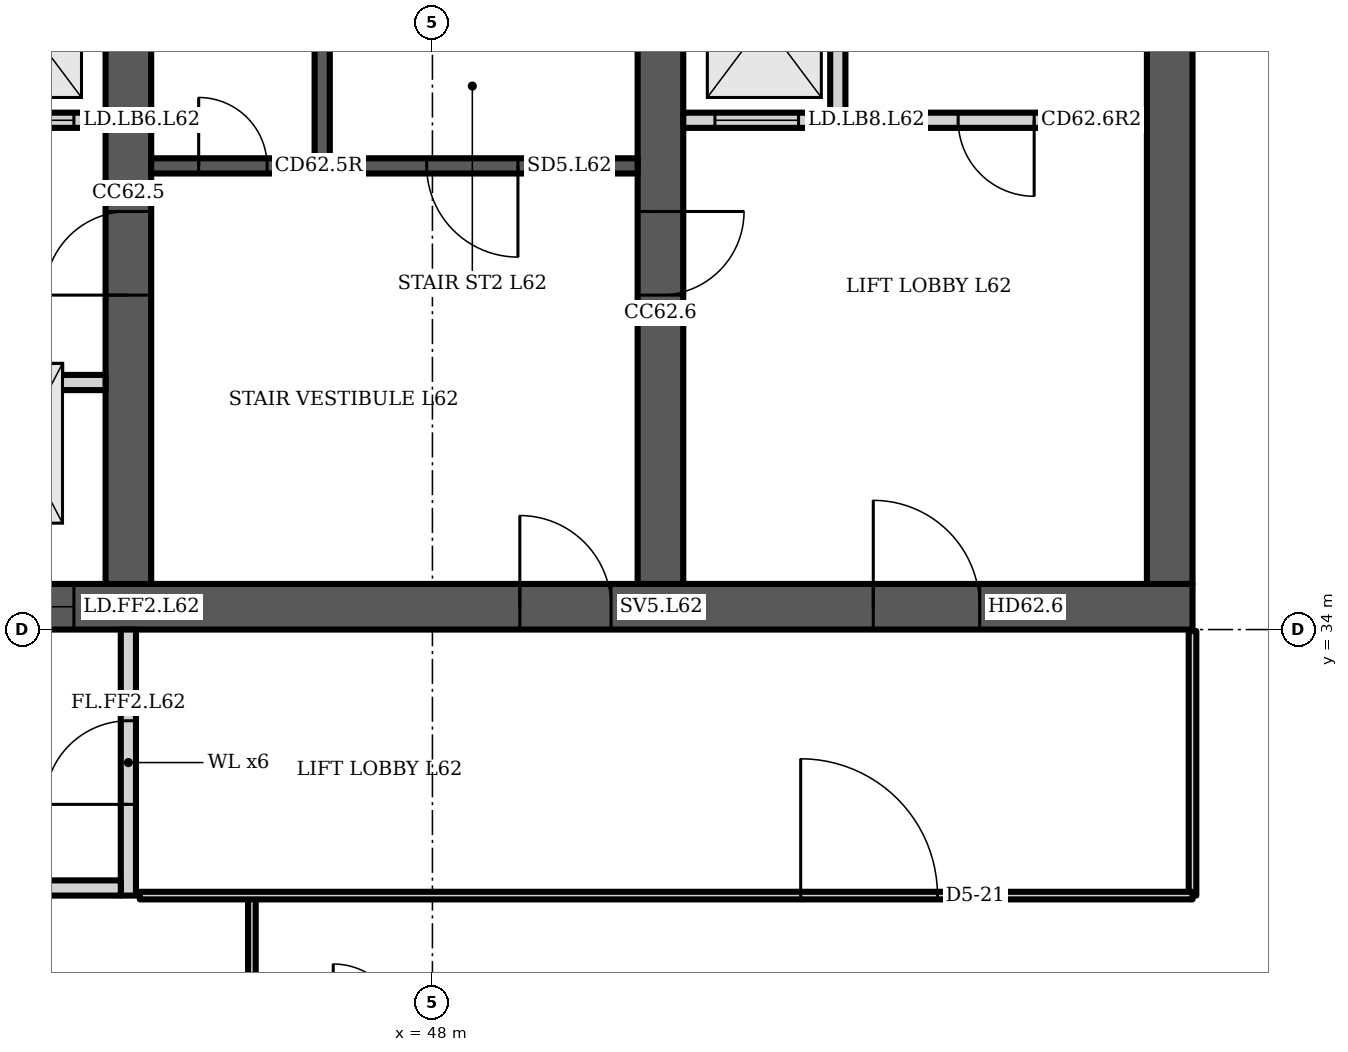
"""IFC4 building model, lengths in metres.
Left out: names, types, materials, properties, quantities, classifications, styles, units other than length and angle.
Written with IfcOpenShell. Run it as: python <this file> out.ifc"""

import sys

from ifc_helpers import new_model, si_unit, direction, frame, frame_2d, origin, place, context, subcontext, project, spatial, polyline, rectangle, outline, extrude, element, fill, save


model = new_model("IFC4")
c1 = context("Model", 3, precision=1e-05, world=origin(), true_north=direction((0.0, 1.0)))
c2 = subcontext(c1, "Body", "Model", "MODEL_VIEW")
j1 = project(units=[si_unit("LENGTHUNIT", "METRE"), si_unit("PLANEANGLEUNIT", "RADIAN")], contexts=[c1])
p1 = place(None, origin())
s1 = spatial("IfcSite", under=j1, at=p1, CompositionType="ELEMENT")
p2 = place(p1, origin())
s2 = spatial("IfcBuilding", under=s1, at=p2, CompositionType="ELEMENT")
p3 = place(p2, frame((0.0, 0.0, 246.7)))
s3 = spatial("IfcBuildingStorey", under=s2, at=p3, CompositionType="ELEMENT", Elevation=246.7)
p4 = place(p3, frame((23.0, 34.3, 0.0), z_axis=(0.0, 0.0, 1.0), x_axis=(1.0, 0.0, 0.0)))
e1 = element("IfcWall", 1, at=p4, inside=s3, PredefinedType="SHEAR", context=c2, shape_type="SweptSolid", body=[
    extrude(rectangle(XDim=35.0, YDim=0.6, at=frame_2d((17.5, 0.0))), origin(), (0.0, 0.0, 1.0), 3.6),
])
p5 = place(p4, frame((0.65, 0.0, 0.0)))
e2 = element("IfcOpeningElement", 2, at=p5, cuts=e1, PredefinedType="OPENING", context=c2, shape_type="SweptSolid", body=[
    extrude(rectangle(XDim=1.2, YDim=2.1, at=frame_2d((0.6, 1.05))), frame((0.0, 0.31, 0.0), z_axis=(0.0, -1.0, 0.0), x_axis=(1.0, 0.0, 0.0)), (0.0, 0.0, 1.0), 0.62),
])
p6 = place(p4, frame((7.717, 0.0, 0.0)))
e3 = element("IfcOpeningElement", 3, at=p6, cuts=e1, PredefinedType="OPENING", context=c2, shape_type="SweptSolid", body=[
    extrude(rectangle(XDim=1.1, YDim=2.1, at=frame_2d((0.55, 1.05))), frame((0.0, 0.31, 0.0), z_axis=(0.0, -1.0, 0.0), x_axis=(1.0, 0.0, 0.0)), (0.0, 0.0, 1.0), 0.62),
])
p7 = place(p4, frame((12.183, 0.0, 0.0)))
e4 = element("IfcOpeningElement", 4, at=p7, cuts=e1, PredefinedType="OPENING", context=c2, shape_type="SweptSolid", body=[
    extrude(rectangle(XDim=1.1, YDim=2.1, at=frame_2d((0.55, 1.05))), frame((0.0, 0.31, 0.0), z_axis=(0.0, -1.0, 0.0), x_axis=(1.0, 0.0, 0.0)), (0.0, 0.0, 1.0), 0.62),
])
p8 = place(p4, frame((9.8, 0.0, 0.0)))
e5 = element("IfcOpeningElement", 5, at=p8, cuts=e1, PredefinedType="OPENING", context=c2, shape_type="SweptSolid", body=[
    extrude(rectangle(XDim=1.4, YDim=2.1, at=frame_2d((0.7, 1.05))), frame((0.0, 0.31, 0.0), z_axis=(0.0, -1.0, 0.0), x_axis=(1.0, 0.0, 0.0)), (0.0, 0.0, 1.0), 0.62),
])
p9 = place(p4, frame((14.717, 0.0, 0.0)))
e6 = element("IfcOpeningElement", 6, at=p9, cuts=e1, PredefinedType="OPENING", context=c2, shape_type="SweptSolid", body=[
    extrude(rectangle(XDim=1.1, YDim=2.1, at=frame_2d((0.55, 1.05))), frame((0.0, 0.31, 0.0), z_axis=(0.0, -1.0, 0.0), x_axis=(1.0, 0.0, 0.0)), (0.0, 0.0, 1.0), 0.62),
])
p10 = place(p4, frame((16.95, 0.0, 0.0)))
e7 = element("IfcOpeningElement", 7, at=p10, cuts=e1, PredefinedType="OPENING", context=c2, shape_type="SweptSolid", body=[
    extrude(rectangle(XDim=1.1, YDim=2.1, at=frame_2d((0.55, 1.05))), frame((0.0, 0.31, 0.0), z_axis=(0.0, -1.0, 0.0), x_axis=(1.0, 0.0, 0.0)), (0.0, 0.0, 1.0), 0.62),
])
p11 = place(p4, frame((19.183, 0.0, 0.0)))
e8 = element("IfcOpeningElement", 8, at=p11, cuts=e1, PredefinedType="OPENING", context=c2, shape_type="SweptSolid", body=[
    extrude(rectangle(XDim=1.1, YDim=2.1, at=frame_2d((0.55, 1.05))), frame((0.0, 0.31, 0.0), z_axis=(0.0, -1.0, 0.0), x_axis=(1.0, 0.0, 0.0)), (0.0, 0.0, 1.0), 0.62),
])
p12 = place(p4, frame((26.15, 0.0, 0.0)))
e9 = element("IfcOpeningElement", 9, at=p12, cuts=e1, PredefinedType="OPENING", context=c2, shape_type="SweptSolid", body=[
    extrude(rectangle(XDim=1.2, YDim=2.1, at=frame_2d((0.6, 1.05))), frame((0.0, 0.31, 0.0), z_axis=(0.0, -1.0, 0.0), x_axis=(1.0, 0.0, 0.0)), (0.0, 0.0, 1.0), 0.62),
])
p13 = place(p4, frame((30.8, 0.0, 0.0)))
e10 = element("IfcOpeningElement", 10, at=p13, cuts=e1, PredefinedType="OPENING", context=c2, shape_type="SweptSolid", body=[
    extrude(rectangle(XDim=1.4, YDim=2.1, at=frame_2d((0.7, 1.05))), frame((0.0, 0.31, 0.0), z_axis=(0.0, -1.0, 0.0), x_axis=(1.0, 0.0, 0.0)), (0.0, 0.0, 1.0), 0.62),
])
p14 = place(p3, frame((44.0, 34.6, 0.0), z_axis=(0.0, 0.0, 1.0), x_axis=(0.0, 1.0, 0.0)))
e11 = element("IfcWall", 11, at=p14, inside=s3, PredefinedType="SHEAR", context=c2, shape_type="SweptSolid", body=[
    extrude(rectangle(XDim=14.784, YDim=0.6, at=frame_2d((7.392, 0.0))), origin(), (0.0, 0.0, 1.0), 3.6),
])
p15 = place(p14, frame((11.608, 0.0, 0.0)))
e12 = element("IfcOpeningElement", 12, at=p15, cuts=e11, PredefinedType="OPENING", context=c2, shape_type="SweptSolid", body=[
    extrude(rectangle(XDim=1.0, YDim=2.1, at=frame_2d((0.5, 1.05))), frame((0.0, 0.31, 0.0), z_axis=(0.0, -1.0, 0.0), x_axis=(1.0, 0.0, 0.0)), (0.0, 0.0, 1.0), 0.62),
])
p16 = place(p14, frame((3.8, 0.0, 0.0)))
e13 = element("IfcOpeningElement", 13, at=p16, cuts=e11, PredefinedType="OPENING", context=c2, shape_type="SweptSolid", body=[
    extrude(rectangle(XDim=1.1, YDim=2.1, at=frame_2d((0.55, 1.05))), frame((0.0, 0.31, 0.0), z_axis=(0.0, -1.0, 0.0), x_axis=(1.0, 0.0, 0.0)), (0.0, 0.0, 1.0), 0.62),
])
p17 = place(p3, frame((51.0, 34.6, 0.0), z_axis=(0.0, 0.0, 1.0), x_axis=(0.0, 1.0, 0.0)))
e14 = element("IfcWall", 14, at=p17, inside=s3, PredefinedType="SHEAR", context=c2, shape_type="SweptSolid", body=[
    extrude(rectangle(XDim=14.171, YDim=0.6, at=frame_2d((7.085, 0.0))), origin(), (0.0, 0.0, 1.0), 3.6),
])
p18 = place(p17, frame((3.8, 0.0, 0.0)))
e15 = element("IfcOpeningElement", 15, at=p18, cuts=e14, PredefinedType="OPENING", context=c2, shape_type="SweptSolid", body=[
    extrude(rectangle(XDim=1.1, YDim=2.1, at=frame_2d((0.55, 1.05))), frame((0.0, 0.31, 0.0), z_axis=(0.0, -1.0, 0.0), x_axis=(1.0, 0.0, 0.0)), (0.0, 0.0, 1.0), 0.62),
])
p19 = place(p3, frame((57.7, 34.6, 0.0), z_axis=(0.0, 0.0, 1.0), x_axis=(0.0, 1.0, 0.0)))
e16 = element("IfcWall", 16, at=p19, inside=s3, PredefinedType="SHEAR", context=c2, shape_type="SweptSolid", body=[
    extrude(rectangle(XDim=13.585, YDim=0.6, at=frame_2d((6.792, 0.0))), origin(), (0.0, 0.0, 1.0), 3.6),
])
p20 = place(p3, frame((37.3, 40.7, 0.0), z_axis=(0.0, 0.0, 1.0), x_axis=(1.0, 0.0, 0.0)))
e17 = element("IfcWall", 17, at=p20, inside=s3, PredefinedType="PARTITIONING", context=c2, shape_type="SweptSolid", body=[
    extrude(rectangle(XDim=6.4, YDim=0.2, at=frame_2d((3.2, 0.0))), origin(), (0.0, 0.0, 1.0), 3.2),
])
p21 = place(p20, frame((0.417, 0.0, 0.0)))
e18 = element("IfcOpeningElement", 18, at=p21, cuts=e17, PredefinedType="OPENING", context=c2, shape_type="SweptSolid", body=[
    extrude(rectangle(XDim=1.1, YDim=2.1, at=frame_2d((0.55, 1.05))), frame((0.0, 0.11, 0.0), z_axis=(0.0, -1.0, 0.0), x_axis=(1.0, 0.0, 0.0)), (0.0, 0.0, 1.0), 0.22),
])
p22 = place(p20, frame((2.65, 0.0, 0.0)))
e19 = element("IfcOpeningElement", 19, at=p22, cuts=e17, PredefinedType="OPENING", context=c2, shape_type="SweptSolid", body=[
    extrude(rectangle(XDim=1.1, YDim=2.1, at=frame_2d((0.55, 1.05))), frame((0.0, 0.11, 0.0), z_axis=(0.0, -1.0, 0.0), x_axis=(1.0, 0.0, 0.0)), (0.0, 0.0, 1.0), 0.22),
])
p23 = place(p20, frame((4.883, 0.0, 0.0)))
e20 = element("IfcOpeningElement", 20, at=p23, cuts=e17, PredefinedType="OPENING", context=c2, shape_type="SweptSolid", body=[
    extrude(rectangle(XDim=1.1, YDim=2.1, at=frame_2d((0.55, 1.05))), frame((0.0, 0.11, 0.0), z_axis=(0.0, -1.0, 0.0), x_axis=(1.0, 0.0, 0.0)), (0.0, 0.0, 1.0), 0.22),
])
p24 = place(p3, frame((0.0, 0.0, -0.0)))
e21 = element("IfcWall", 21, at=p24, inside=s3, PredefinedType="PARTITIONING", context=c2, shape_type="SweptSolid", body=[
    extrude(outline(polyline([(41.567, 37.1), (39.433, 37.1), (39.433, 34.6), (39.233, 34.6), (39.233, 37.45), (37.3, 37.45), (37.3, 37.65), (39.233, 37.65), (39.433, 37.65), (39.433, 37.3), (41.567, 37.3), (41.567, 37.35), (41.767, 37.35), (43.7, 37.35), (43.7, 37.15), (41.767, 37.15), (41.767, 34.6), (41.567, 34.6), (41.567, 37.1)])), origin(), (0.0, 0.0, 1.0), 3.2),
])
p25 = place(p3, frame((0.0, 0.0, -0.0)))
e22 = element("IfcWall", 22, at=p25, inside=s3, PredefinedType="PARTITIONING", context=c2, shape_type="SweptSolid", body=[
    extrude(outline(polyline([(39.433, 40.8), (39.233, 40.8), (39.233, 43.8), (37.3, 43.8), (37.3, 44.0), (43.7, 44.0), (43.7, 43.8), (41.767, 43.8), (41.767, 40.8), (41.567, 40.8), (41.567, 43.8), (39.433, 43.8), (39.433, 40.8)])), origin(), (0.0, 0.0, 1.0), 3.2),
])
p26 = place(p3, frame((44.3, 40.1, 0.0), z_axis=(0.0, 0.0, 1.0), x_axis=(1.0, 0.0, 0.0)))
e23 = element("IfcWall", 23, at=p26, inside=s3, PredefinedType="SHEAR", context=c2, shape_type="SweptSolid", body=[
    extrude(rectangle(XDim=6.4, YDim=0.2, at=frame_2d((3.2, 0.0))), origin(), (0.0, 0.0, 1.0), 3.2),
])
p27 = place(p26, frame((3.625, 0.0, 0.0)))
e24 = element("IfcOpeningElement", 24, at=p27, cuts=e23, PredefinedType="OPENING", context=c2, shape_type="SweptSolid", body=[
    extrude(rectangle(XDim=1.2, YDim=2.1, at=frame_2d((0.6, 1.05))), frame((0.0, 0.11, 0.0), z_axis=(0.0, -1.0, 0.0), x_axis=(1.0, 0.0, 0.0)), (0.0, 0.0, 1.0), 0.22),
])
p28 = place(p26, frame((0.625, 0.0, 0.0)))
e25 = element("IfcOpeningElement", 25, at=p28, cuts=e23, PredefinedType="OPENING", context=c2, shape_type="SweptSolid", body=[
    extrude(rectangle(XDim=0.9, YDim=2.1, at=frame_2d((0.45, 1.05))), frame((0.0, 0.11, 0.0), z_axis=(0.0, -1.0, 0.0), x_axis=(1.0, 0.0, 0.0)), (0.0, 0.0, 1.0), 0.22),
])
p29 = place(p3, frame((46.55, 40.2, 0.0), z_axis=(0.0, 0.0, 1.0), x_axis=(0.0, 1.0, 0.0)))
e26 = element("IfcWall", 26, at=p29, inside=s3, PredefinedType="SHEAR", context=c2, shape_type="SweptSolid", body=[
    extrude(rectangle(XDim=7.2, YDim=0.2, at=frame_2d((3.6, 0.0))), origin(), (0.0, 0.0, 1.0), 3.2),
])
p30 = place(p3, frame((51.3, 40.7, 0.0), z_axis=(0.0, 0.0, 1.0), x_axis=(1.0, 0.0, 0.0)))
e27 = element("IfcWall", 27, at=p30, inside=s3, PredefinedType="PARTITIONING", context=c2, shape_type="SweptSolid", body=[
    extrude(rectangle(XDim=6.1, YDim=0.2, at=frame_2d((3.05, 0.0))), origin(), (0.0, 0.0, 1.0), 3.2),
])
p31 = place(p30, frame((0.417, 0.0, 0.0)))
e28 = element("IfcOpeningElement", 28, at=p31, cuts=e27, PredefinedType="OPENING", context=c2, shape_type="SweptSolid", body=[
    extrude(rectangle(XDim=1.1, YDim=2.1, at=frame_2d((0.55, 1.05))), frame((0.0, 0.11, 0.0), z_axis=(0.0, -1.0, 0.0), x_axis=(1.0, 0.0, 0.0)), (0.0, 0.0, 1.0), 0.22),
])
p32 = place(p30, frame((3.617, 0.0, 0.0)))
e29 = element("IfcOpeningElement", 29, at=p32, cuts=e27, PredefinedType="OPENING", context=c2, shape_type="SweptSolid", body=[
    extrude(rectangle(XDim=1.0, YDim=2.1, at=frame_2d((0.5, 1.05))), frame((0.0, 0.11, 0.0), z_axis=(0.0, -1.0, 0.0), x_axis=(1.0, 0.0, 0.0)), (0.0, 0.0, 1.0), 0.22),
])
p33 = place(p3, frame((0.0, 0.0, -0.0)))
e30 = element("IfcWall", 30, at=p33, inside=s3, PredefinedType="PARTITIONING", context=c2, shape_type="SweptSolid", body=[
    extrude(outline(polyline([(53.433, 40.8), (53.433, 43.8), (53.233, 43.8), (53.233, 40.8), (53.433, 40.8)])), origin(), (0.0, 0.0, 1.0), 3.2),
])
p34 = place(p3, frame((44.0, 30.5, 0.0), z_axis=(0.0, 0.0, 1.0), x_axis=(0.0, 1.0, 0.0)))
e31 = element("IfcWall", 31, at=p34, inside=s3, PredefinedType="PARTITIONING", context=c2, shape_type="SweptSolid", body=[
    extrude(rectangle(XDim=3.5, YDim=0.2, at=frame_2d((1.75, 0.0))), origin(), (0.0, 0.0, 1.0), 3.2),
])
p35 = place(p34, frame((1.2, 0.0, 0.0)))
e32 = element("IfcOpeningElement", 32, at=p35, cuts=e31, PredefinedType="OPENING", context=c2, shape_type="SweptSolid", body=[
    extrude(rectangle(XDim=1.1, YDim=2.1, at=frame_2d((0.55, 1.05))), frame((0.0, 0.11, 0.0), z_axis=(0.0, -1.0, 0.0), x_axis=(1.0, 0.0, 0.0)), (0.0, 0.0, 1.0), 0.22),
])
p36 = place(p3, frame((41.1, 30.6, 0.0), z_axis=(0.0, 0.0, 1.0), x_axis=(1.0, 0.0, 0.0)))
e33 = element("IfcWall", 33, at=p36, inside=s3, PredefinedType="PARTITIONING", context=c2, shape_type="SweptSolid", body=[
    extrude(rectangle(XDim=2.8, YDim=0.2, at=frame_2d((1.4, 0.0))), origin(), (0.0, 0.0, 1.0), 3.2),
])
p37 = place(p3, frame((45.625, 22.36, 0.0), z_axis=(0.0, 0.0, 1.0), x_axis=(0.0, 1.0, 0.0)))
e34 = element("IfcWall", 34, at=p37, inside=s3, PredefinedType="PARTITIONING", context=c2, shape_type="SweptSolid", body=[
    extrude(rectangle(XDim=8.13, YDim=0.1, at=frame_2d((4.065, 0.0))), origin(), (0.0, 0.0, 1.0), 3.2),
])
p38 = place(p3, frame((58.0, 30.5, 0.0), z_axis=(0.0, 0.0, 1.0), x_axis=(0.0, 1.0, 0.0)))
e35 = element("IfcWall", 35, at=p38, inside=s3, PredefinedType="PARTITIONING", context=c2, shape_type="SweptSolid", body=[
    extrude(rectangle(XDim=3.48, YDim=0.1, at=frame_2d((1.74, 0.0))), origin(), (0.0, 0.0, 1.0), 3.2),
])
p39 = place(p3, frame((44.15, 30.5, 0.0), z_axis=(0.0, 0.0, 1.0), x_axis=(1.0, 0.0, 0.0)))
e36 = element("IfcWall", 36, at=p39, inside=s3, PredefinedType="PARTITIONING", context=c2, shape_type="SweptSolid", body=[
    extrude(rectangle(XDim=13.85, YDim=0.1, at=frame_2d((6.925, 0.0))), origin(), (0.0, 0.0, 1.0), 3.2),
])
p40 = place(p39, frame((8.695, 0.0, 0.0)))
e37 = element("IfcOpeningElement", 37, at=p40, cuts=e36, PredefinedType="OPENING", context=c2, shape_type="SweptSolid", body=[
    extrude(rectangle(XDim=1.8, YDim=2.1, at=frame_2d((0.9, 1.05))), frame((0.0, 0.06, 0.0), z_axis=(0.0, -1.0, 0.0), x_axis=(1.0, 0.0, 0.0)), (0.0, 0.0, 1.0), 0.12),
])
p41 = place(p11, origin())
e38 = element("IfcDoor", 38, at=p41, inside=s3, OperationType="DOUBLE_DOOR_SLIDING", PredefinedType="DOOR", context=c2, shape_type="SweptSolid", body=[
    extrude(rectangle(XDim=1.1, YDim=2.1, at=frame_2d((0.55, 1.05))), frame((0.0, 0.025, 0.0), z_axis=(0.0, -1.0, 0.0), x_axis=(1.0, 0.0, 0.0)), (0.0, 0.0, 1.0), 0.05),
])
fill(e8, e38)
p42 = place(p23, origin())
e39 = element("IfcDoor", 39, at=p42, inside=s3, OperationType="DOUBLE_DOOR_SLIDING", PredefinedType="DOOR", context=c2, shape_type="SweptSolid", body=[
    extrude(rectangle(XDim=1.1, YDim=2.1, at=frame_2d((0.55, 1.05))), frame((0.0, 0.025, 0.0), z_axis=(0.0, -1.0, 0.0), x_axis=(1.0, 0.0, 0.0)), (0.0, 0.0, 1.0), 0.05),
])
fill(e20, e39)
p43 = place(p27, origin())
e40 = element("IfcDoor", 40, at=p43, inside=s3, OperationType="SINGLE_SWING_RIGHT", PredefinedType="DOOR", context=c2, shape_type="SweptSolid", body=[
    extrude(rectangle(XDim=1.2, YDim=2.1, at=frame_2d((0.6, 1.05))), frame((0.0, 0.025, 0.0), z_axis=(0.0, -1.0, 0.0), x_axis=(1.0, 0.0, 0.0)), (0.0, 0.0, 1.0), 0.05),
])
fill(e24, e40)
p44 = place(p28, origin())
e41 = element("IfcDoor", 41, at=p44, inside=s3, OperationType="SINGLE_SWING_LEFT", PredefinedType="DOOR", context=c2, shape_type="SweptSolid", body=[
    extrude(rectangle(XDim=0.9, YDim=2.1, at=frame_2d((0.45, 1.05))), frame((0.0, 0.025, 0.0), z_axis=(0.0, -1.0, 0.0), x_axis=(1.0, 0.0, 0.0)), (0.0, 0.0, 1.0), 0.05),
])
fill(e25, e41)
p45 = place(p12, origin())
e42 = element("IfcDoor", 42, at=p45, inside=s3, OperationType="SINGLE_SWING_LEFT", PredefinedType="DOOR", context=c2, shape_type="SweptSolid", body=[
    extrude(rectangle(XDim=1.2, YDim=2.1, at=frame_2d((0.6, 1.05))), frame((0.0, 0.025, 0.0), z_axis=(0.0, -1.0, 0.0), x_axis=(1.0, 0.0, 0.0)), (0.0, 0.0, 1.0), 0.05),
])
fill(e9, e42)
p46 = place(p13, origin())
e43 = element("IfcDoor", 43, at=p46, inside=s3, OperationType="DOUBLE_DOOR_SINGLE_SWING", PredefinedType="DOOR", context=c2, shape_type="SweptSolid", body=[
    extrude(rectangle(XDim=1.4, YDim=2.1, at=frame_2d((0.7, 1.05))), frame((0.0, 0.025, 0.0), z_axis=(0.0, -1.0, 0.0), x_axis=(1.0, 0.0, 0.0)), (0.0, 0.0, 1.0), 0.05),
])
fill(e10, e43)
p47 = place(p31, origin())
e44 = element("IfcDoor", 44, at=p47, inside=s3, OperationType="DOUBLE_DOOR_SLIDING", PredefinedType="DOOR", context=c2, shape_type="SweptSolid", body=[
    extrude(rectangle(XDim=1.1, YDim=2.1, at=frame_2d((0.55, 1.05))), frame((0.0, 0.025, 0.0), z_axis=(0.0, -1.0, 0.0), x_axis=(1.0, 0.0, 0.0)), (0.0, 0.0, 1.0), 0.05),
])
fill(e28, e44)
p48 = place(p32, origin())
e45 = element("IfcDoor", 45, at=p48, inside=s3, OperationType="SINGLE_SWING_RIGHT", PredefinedType="DOOR", context=c2, shape_type="SweptSolid", body=[
    extrude(rectangle(XDim=1.0, YDim=2.1, at=frame_2d((0.5, 1.05))), frame((0.0, 0.025, 0.0), z_axis=(0.0, -1.0, 0.0), x_axis=(1.0, 0.0, 0.0)), (0.0, 0.0, 1.0), 0.05),
])
fill(e29, e45)
p49 = place(p16, origin())
e46 = element("IfcDoor", 46, at=p49, inside=s3, OperationType="SINGLE_SWING_LEFT", PredefinedType="DOOR", context=c2, shape_type="SweptSolid", body=[
    extrude(rectangle(XDim=1.1, YDim=2.1, at=frame_2d((0.55, 1.05))), frame((0.0, 0.025, 0.0), z_axis=(0.0, -1.0, 0.0), x_axis=(1.0, 0.0, 0.0)), (0.0, 0.0, 1.0), 0.05),
])
fill(e13, e46)
p50 = place(p18, origin())
e47 = element("IfcDoor", 47, at=p50, inside=s3, OperationType="SINGLE_SWING_RIGHT", PredefinedType="DOOR", context=c2, shape_type="SweptSolid", body=[
    extrude(rectangle(XDim=1.1, YDim=2.1, at=frame_2d((0.55, 1.05))), frame((0.0, 0.025, 0.0), z_axis=(0.0, -1.0, 0.0), x_axis=(1.0, 0.0, 0.0)), (0.0, 0.0, 1.0), 0.05),
])
fill(e15, e47)
p51 = place(p35, origin())
e48 = element("IfcDoor", 48, at=p51, inside=s3, OperationType="SINGLE_SWING_LEFT", PredefinedType="DOOR", context=c2, shape_type="SweptSolid", body=[
    extrude(rectangle(XDim=1.1, YDim=2.1, at=frame_2d((0.55, 1.05))), frame((0.0, 0.025, 0.0), z_axis=(0.0, -1.0, 0.0), x_axis=(1.0, 0.0, 0.0)), (0.0, 0.0, 1.0), 0.05),
])
fill(e32, e48)
p52 = place(p40, origin())
e49 = element("IfcDoor", 49, at=p52, inside=s3, OperationType="DOUBLE_DOOR_SINGLE_SWING", PredefinedType="DOOR", context=c2, shape_type="SweptSolid", body=[
    extrude(rectangle(XDim=1.8, YDim=2.1, at=frame_2d((0.9, 1.05))), frame((0.0, 0.025, 0.0), z_axis=(0.0, -1.0, 0.0), x_axis=(1.0, 0.0, 0.0)), (0.0, 0.0, 1.0), 0.05),
])
fill(e37, e49)
save(model, sys.argv[1])
